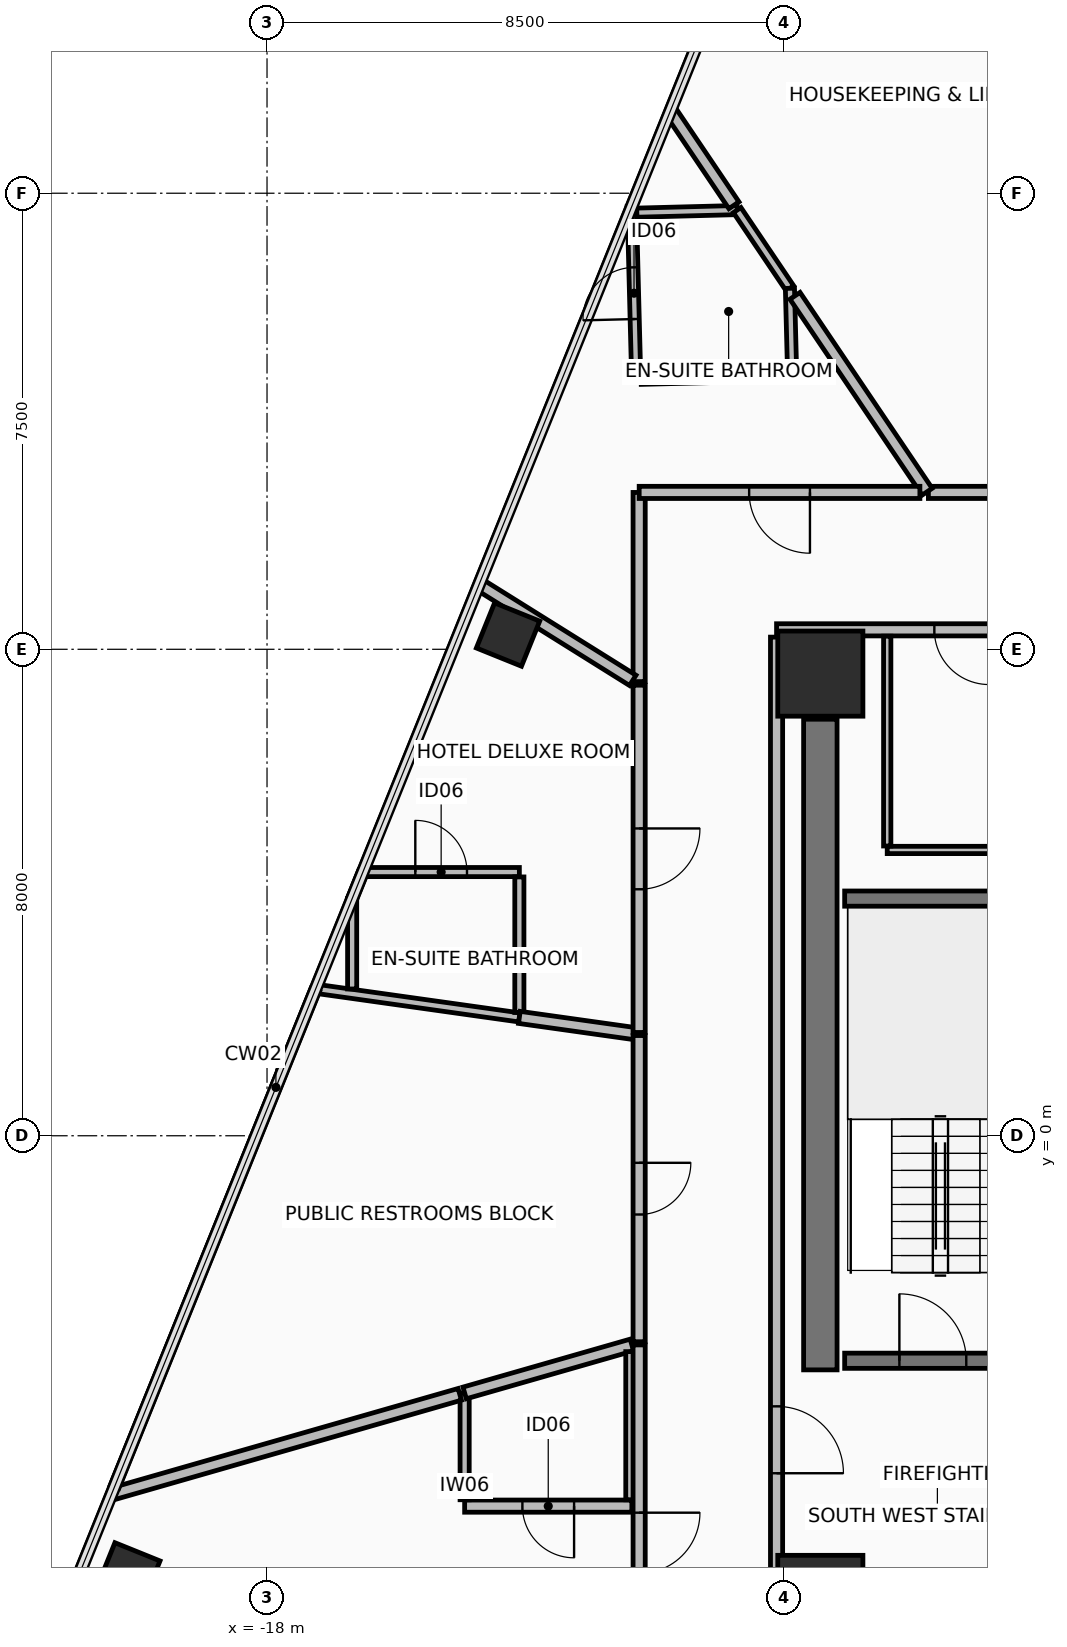
"""IFC4 building model, lengths in metres.
Left out: names, types, materials, properties, quantities, classifications, styles, units other than length and angle.
Written with IfcOpenShell. Run it as: python <this file> out.ifc"""

import sys

from ifc_helpers import new_model, si_unit, direction, frame, frame_2d, origin, origin_2d, place, context, subcontext, project, spatial, rectangle, hollow_rectangle, extrude, element, fill, save


model = new_model("IFC4")
c1 = context("Model", 3, precision=1e-05, world=origin(), true_north=direction((0.0, 1.0)))
c2 = subcontext(c1, "Body", "Model", "MODEL_VIEW")
j1 = project(units=[si_unit("LENGTHUNIT", "METRE"), si_unit("PLANEANGLEUNIT", "RADIAN")], contexts=[c1])
p1 = place(None, origin())
s1 = spatial("IfcSite", under=j1, at=p1, CompositionType="ELEMENT")
p2 = place(p1, origin())
s2 = spatial("IfcBuilding", under=s1, at=p2, CompositionType="ELEMENT")
p3 = place(p2, frame((0.0, 0.0, 70.75)))
s3 = spatial("IfcBuildingStorey", under=s2, at=p3, CompositionType="ELEMENT", Elevation=70.75)
for number, where, z_axis, x_axis in (
    (1, (-8.9, -7.6, 0.0), (0.0, 0.0, 1.0), (1.0, 0.0, 0.0)),
    (2, (-8.9, 7.6, 0.0), (0.0, 0.0, 1.0), (1.0, 0.0, 0.0)),
):
    element("IfcColumn", number, at=place(p3, frame(where, z_axis=z_axis, x_axis=x_axis)), inside=s3, PredefinedType="COLUMN", context=c2, shape_type="SweptSolid", body=[
        extrude(rectangle(XDim=1.4, YDim=1.4, at=origin_2d()), origin(), (0.0, 0.0, 1.0), 3.45),
    ])
for number, where, z_axis, x_axis in (
    (3, (-14.036, 8.242, 0.0), (0.0, 0.0, 1.0), (0.375, 0.927, 0.0)),
    (4, (-20.281, -7.213, 0.0), (0.0, 0.0, 1.0), (0.375, 0.927, 0.0)),
):
    element("IfcColumn", number, at=place(p3, frame(where, z_axis=z_axis, x_axis=x_axis)), inside=s3, PredefinedType="COLUMN", context=c2, shape_type="SweptSolid", body=[
        extrude(hollow_rectangle(XDim=0.8, YDim=0.8, WallThickness=0.045, at=origin_2d()), origin(), (0.0, 0.0, 1.0), 3.45),
    ])
p4 = place(p3, frame((-8.9, -3.85, 0.0), z_axis=(0.0, 0.0, 1.0), x_axis=(0.0, 1.0, 0.0)))
e5 = element("IfcWall", 5, at=p4, inside=s3, PredefinedType="SHEAR", context=c2, shape_type="SweptSolid", body=[
    extrude(rectangle(XDim=10.7, YDim=0.55, at=frame_2d((5.35, 0.0))), origin(), (0.0, 0.0, 1.0), 3.275),
])
p5 = place(p3, frame((9.62, 8.32, 0.0), z_axis=(0.0, 0.0, 1.0), x_axis=(-1.0, 0.0, 0.0)))
e6 = element("IfcWall", 6, at=p5, inside=s3, PredefinedType="PARTITIONING", context=c2, shape_type="SweptSolid", body=[
    extrude(rectangle(XDim=19.24, YDim=0.2, at=frame_2d((9.62, 0.0))), origin(), (0.0, 0.0, 1.0), 2.62),
])
p6 = place(p5, frame((15.745, 0.0, 0.0)))
e7 = element("IfcOpeningElement", 7, at=p6, cuts=e6, PredefinedType="OPENING", context=c2, shape_type="SweptSolid", body=[
    extrude(rectangle(XDim=0.9, YDim=2.1, at=frame_2d((0.45, 1.05))), frame((0.0, 0.11, 0.0), z_axis=(0.0, -1.0, 0.0), x_axis=(1.0, 0.0, 0.0)), (0.0, 0.0, 1.0), 0.22),
])
p7 = place(p5, frame((13.795, 0.0, 0.0)))
e8 = element("IfcOpeningElement", 8, at=p7, cuts=e6, PredefinedType="OPENING", context=c2, shape_type="SweptSolid", body=[
    extrude(rectangle(XDim=0.9, YDim=2.1, at=frame_2d((0.45, 1.05))), frame((0.0, 0.11, 0.0), z_axis=(0.0, -1.0, 0.0), x_axis=(1.0, 0.0, 0.0)), (0.0, 0.0, 1.0), 0.22),
])
p8 = place(p3, frame((-9.62, 8.2, 0.0), z_axis=(0.0, 0.0, 1.0), x_axis=(0.0, -1.0, 0.0)))
e9 = element("IfcWall", 9, at=p8, inside=s3, PredefinedType="PARTITIONING", context=c2, shape_type="SweptSolid", body=[
    extrude(rectangle(XDim=16.4, YDim=0.2, at=frame_2d((8.2, 0.0))), origin(), (0.0, 0.0, 1.0), 2.67),
])
p9 = place(p8, frame((12.65, 0.0, 0.0)))
e10 = element("IfcOpeningElement", 10, at=p9, cuts=e9, PredefinedType="OPENING", context=c2, shape_type="SweptSolid", body=[
    extrude(rectangle(XDim=1.1, YDim=2.15, at=frame_2d((0.55, 1.075))), frame((0.0, 0.11, 0.0), z_axis=(0.0, -1.0, 0.0), x_axis=(1.0, 0.0, 0.0)), (0.0, 0.0, 1.0), 0.22),
])
p10 = place(p3, frame((-8.5, -3.7, 0.0), z_axis=(0.0, 0.0, 1.0), x_axis=(1.0, 0.0, 0.0)))
e11 = element("IfcWall", 11, at=p10, inside=s3, PredefinedType="SHEAR", context=c2, shape_type="SweptSolid", body=[
    extrude(rectangle(XDim=2.95, YDim=0.25, at=frame_2d((1.475, 0.0))), origin(), (0.0, 0.0, 1.0), 3.275),
])
p11 = place(p10, frame((0.9, 0.0, 0.0)))
e12 = element("IfcOpeningElement", 12, at=p11, cuts=e11, PredefinedType="OPENING", context=c2, shape_type="SweptSolid", body=[
    extrude(rectangle(XDim=1.1, YDim=2.15, at=frame_2d((0.55, 1.075))), frame((0.0, 0.135, 0.0), z_axis=(0.0, -1.0, 0.0), x_axis=(1.0, 0.0, 0.0)), (0.0, 0.0, 1.0), 0.27),
])
p12 = place(p3, frame((-8.5, 3.9, 0.0), z_axis=(0.0, 0.0, 1.0), x_axis=(1.0, 0.0, 0.0)))
e13 = element("IfcWall", 13, at=p12, inside=s3, PredefinedType="SHEAR", context=c2, shape_type="SweptSolid", body=[
    extrude(rectangle(XDim=2.95, YDim=0.25, at=frame_2d((1.475, 0.0))), origin(), (0.0, 0.0, 1.0), 3.275),
])
p13 = place(p3, frame((-7.8, 4.7, 0.0), z_axis=(0.0, 0.0, 1.0), x_axis=(1.0, 0.0, 0.0)))
e14 = element("IfcWall", 14, at=p13, inside=s3, PredefinedType="PARTITIONING", context=c2, shape_type="SweptSolid", body=[
    extrude(rectangle(XDim=2.45, YDim=0.12, at=frame_2d((1.225, 0.0))), origin(), (0.0, 0.0, 1.0), 3.275),
])
p14 = place(p3, frame((-7.8, 8.215, 0.0), z_axis=(0.0, 0.0, 1.0), x_axis=(0.0, -1.0, 0.0)))
e15 = element("IfcWall", 15, at=p14, inside=s3, PredefinedType="PARTITIONING", context=c2, shape_type="SweptSolid", body=[
    extrude(rectangle(XDim=3.45, YDim=0.12, at=frame_2d((1.725, 0.0))), origin(), (0.0, 0.0, 1.0), 2.47),
])
p15 = place(p3, frame((-11.927, 12.429, 0.0), z_axis=(0.0, 0.0, 1.0), x_axis=(-0.025753181092, 0.99966833183, 0.0)))
e16 = element("IfcWall", 16, at=p15, inside=s3, PredefinedType="PARTITIONING", context=c2, shape_type="SweptSolid", body=[
    extrude(rectangle(XDim=2.854, YDim=0.15, at=frame_2d((1.427, 0.0))), origin(), (0.0, 0.0, 1.0), 2.47),
])
p16 = place(p15, frame((1.002, 0.0, 0.0)))
e17 = element("IfcOpeningElement", 17, at=p16, cuts=e16, PredefinedType="OPENING", context=c2, shape_type="SweptSolid", body=[
    extrude(rectangle(XDim=0.85, YDim=2.1, at=frame_2d((0.425, 1.05))), frame((0.0, 0.085, 0.0), z_axis=(0.0, -1.0, 0.0), x_axis=(1.0, 0.0, 0.0)), (0.0, 0.0, 1.0), 0.17),
])
p17 = place(p3, frame((-11.918, 15.18, 0.0), z_axis=(0.0, 0.0, 1.0), x_axis=(0.999668899852, 0.02573112257, 0.0)))
e18 = element("IfcWall", 18, at=p17, inside=s3, PredefinedType="PARTITIONING", context=c2, shape_type="SweptSolid", body=[
    extrude(rectangle(XDim=1.651, YDim=0.15, at=frame_2d((0.825, 0.0))), origin(), (0.0, 0.0, 1.0), 2.47),
])
p18 = place(p3, frame((-10.268, 15.223, 0.0), z_axis=(0.0, 0.0, 1.0), x_axis=(0.559229675695, -0.82901276819, 0.0)))
e19 = element("IfcWall", 19, at=p18, inside=s3, PredefinedType="PARTITIONING", context=c2, shape_type="SweptSolid", body=[
    extrude(rectangle(XDim=1.552, YDim=0.15, at=frame_2d((0.776, 0.0))), origin(), (0.0, 0.0, 1.0), 3.275),
])
p19 = place(p3, frame((-9.4, 13.936, 0.0), z_axis=(0.0, 0.0, 1.0), x_axis=(0.025745445057, -0.999668531094, 0.0)))
e20 = element("IfcWall", 20, at=p19, inside=s3, PredefinedType="PARTITIONING", context=c2, shape_type="SweptSolid", body=[
    extrude(rectangle(XDim=1.441, YDim=0.15, at=frame_2d((0.721, 0.0))), origin(), (0.0, 0.0, 1.0), 3.275),
])
p20 = place(p3, frame((-9.443, 12.493, 0.0), z_axis=(0.0, 0.0, 1.0), x_axis=(-0.999667618691, -0.025780848324, 0.0)))
e21 = element("IfcWall", 21, at=p20, inside=s3, PredefinedType="PARTITIONING", context=c2, shape_type="SweptSolid", body=[
    extrude(rectangle(XDim=2.405, YDim=0.15, at=frame_2d((1.203, 0.0))), origin(), (0.0, 0.0, 1.0), 3.275),
])
p21 = place(p3, frame((-13.85, 1.947, 0.0), z_axis=(0.0, 0.0, 1.0), x_axis=(-0.99026466636, 0.139197308016, 0.0)))
e22 = element("IfcWall", 22, at=p21, inside=s3, PredefinedType="PARTITIONING", context=c2, shape_type="SweptSolid", body=[
    extrude(rectangle(XDim=3.382, YDim=0.15, at=frame_2d((1.691, 0.0))), origin(), (0.0, 0.0, 1.0), 2.47),
])
p22 = place(p3, frame((-16.6, 2.414, 0.0), z_axis=(0.0, 0.0, 1.0), x_axis=(0.0, 1.0, 0.0)))
e23 = element("IfcWall", 23, at=p22, inside=s3, PredefinedType="PARTITIONING", context=c2, shape_type="SweptSolid", body=[
    extrude(rectangle(XDim=1.485, YDim=0.15, at=frame_2d((0.743, 0.0))), origin(), (0.0, 0.0, 1.0), 2.47),
])
p23 = place(p3, frame((-16.6, 3.899, 0.0), z_axis=(0.0, 0.0, 1.0), x_axis=(0.374779708699, 0.927113892652, 0.0)))
e24 = element("IfcWall", 24, at=p23, inside=s3, PredefinedType="PARTITIONING", context=c2, shape_type="SweptSolid", body=[
    extrude(rectangle(XDim=0.472, YDim=0.15, at=frame_2d((0.236, 0.0))), origin(), (0.0, 0.0, 1.0), 3.275),
])
p24 = place(p3, frame((-16.423, 4.336, 0.0), z_axis=(0.0, 0.0, 1.0), x_axis=(1.0, 0.0, 0.0)))
e25 = element("IfcWall", 25, at=p24, inside=s3, PredefinedType="PARTITIONING", context=c2, shape_type="SweptSolid", body=[
    extrude(rectangle(XDim=2.573, YDim=0.15, at=frame_2d((1.287, 0.0))), origin(), (0.0, 0.0, 1.0), 2.47),
])
p25 = place(p24, frame((0.862, 0.0, 0.0)))
e26 = element("IfcOpeningElement", 26, at=p25, cuts=e25, PredefinedType="OPENING", context=c2, shape_type="SweptSolid", body=[
    extrude(rectangle(XDim=0.85, YDim=2.1, at=frame_2d((0.425, 1.05))), frame((0.0, 0.085, 0.0), z_axis=(0.0, -1.0, 0.0), x_axis=(1.0, 0.0, 0.0)), (0.0, 0.0, 1.0), 0.17),
])
p26 = place(p3, frame((-13.85, 4.257, 0.0), z_axis=(0.0, 0.0, 1.0), x_axis=(0.0, -1.0, 0.0)))
e27 = element("IfcWall", 27, at=p26, inside=s3, PredefinedType="PARTITIONING", context=c2, shape_type="SweptSolid", body=[
    extrude(rectangle(XDim=2.229, YDim=0.15, at=frame_2d((1.115, 0.0))), origin(), (0.0, 0.0, 1.0), 3.275),
])
p27 = place(p3, frame((-12.0, -6.091, 0.0), z_axis=(0.0, 0.0, 1.0), x_axis=(-1.0, 0.0, 0.0)))
e28 = element("IfcWall", 28, at=p27, inside=s3, PredefinedType="PARTITIONING", context=c2, shape_type="SweptSolid", body=[
    extrude(rectangle(XDim=2.75, YDim=0.2, at=frame_2d((1.375, 0.0))), origin(), (0.0, 0.0, 1.0), 2.87),
])
p28 = place(p27, frame((0.95, 0.0, 0.0)))
e29 = element("IfcOpeningElement", 29, at=p28, cuts=e28, PredefinedType="OPENING", context=c2, shape_type="SweptSolid", body=[
    extrude(rectangle(XDim=0.85, YDim=2.1, at=frame_2d((0.425, 1.05))), frame((0.0, 0.11, 0.0), z_axis=(0.0, -1.0, 0.0), x_axis=(1.0, 0.0, 0.0)), (0.0, 0.0, 1.0), 0.22),
])
p29 = place(p3, frame((-14.75, -5.986, 0.0), z_axis=(0.0, 0.0, 1.0), x_axis=(0.0, 1.0, 0.0)))
e30 = element("IfcWall", 30, at=p29, inside=s3, PredefinedType="PARTITIONING", context=c2, shape_type="SweptSolid", body=[
    extrude(rectangle(XDim=1.756, YDim=0.15, at=frame_2d((0.878, 0.0))), origin(), (0.0, 0.0, 1.0), 2.87),
])
p30 = place(p3, frame((-14.75, -4.229, 0.0), z_axis=(0.0, 0.0, 1.0), x_axis=(0.961259435334, 0.275645239358, 0.0)))
e31 = element("IfcWall", 31, at=p30, inside=s3, PredefinedType="PARTITIONING", context=c2, shape_type="SweptSolid", body=[
    extrude(rectangle(XDim=2.861, YDim=0.2, at=frame_2d((1.43, 0.0))), origin(), (0.0, 0.0, 1.0), 2.87),
])
p31 = place(p3, frame((-12.0, -3.55, 0.0), z_axis=(0.0, 0.0, 1.0), x_axis=(0.0, -1.0, 0.0)))
e32 = element("IfcWall", 32, at=p31, inside=s3, PredefinedType="PARTITIONING", context=c2, shape_type="SweptSolid", body=[
    extrude(rectangle(XDim=2.436, YDim=0.2, at=frame_2d((1.218, 0.0))), origin(), (0.0, 0.0, 1.0), 3.275),
])
p32 = place(p3, frame((-13.85, 1.947, 0.0), z_axis=(0.0, 0.0, 1.0), x_axis=(0.990262192263, -0.139214907871, 0.0)))
e33 = element("IfcWall", 33, at=p32, inside=s3, PredefinedType="PARTITIONING", context=c2, shape_type="SweptSolid", body=[
    extrude(rectangle(XDim=1.968, YDim=0.2, at=frame_2d((0.984, 0.0))), origin(), (0.0, 0.0, 1.0), 2.87),
])
p33 = place(p3, frame((-11.88, 1.648, 0.0), z_axis=(0.0, 0.0, 1.0), x_axis=(0.0, -1.0, 0.0)))
e34 = element("IfcWall", 34, at=p33, inside=s3, PredefinedType="PARTITIONING", context=c2, shape_type="SweptSolid", body=[
    extrude(rectangle(XDim=5.036, YDim=0.2, at=frame_2d((2.518, 0.0))), origin(), (0.0, 0.0, 1.0), 3.275),
])
p34 = place(p33, frame((2.093, 0.0, 0.0)))
e35 = element("IfcOpeningElement", 35, at=p34, cuts=e34, PredefinedType="OPENING", context=c2, shape_type="SweptSolid", body=[
    extrude(rectangle(XDim=0.85, YDim=2.1, at=frame_2d((0.425, 1.05))), frame((0.0, 0.11, 0.0), z_axis=(0.0, -1.0, 0.0), x_axis=(1.0, 0.0, 0.0)), (0.0, 0.0, 1.0), 0.22),
])
p35 = place(p3, frame((-14.83, -4.252, 0.0), z_axis=(0.0, 0.0, 1.0), x_axis=(-0.961263721078, -0.275630293216, 0.0)))
e36 = element("IfcWall", 36, at=p35, inside=s3, PredefinedType="PARTITIONING", context=c2, shape_type="SweptSolid", body=[
    extrude(rectangle(XDim=5.958, YDim=0.2, at=frame_2d((2.979, 0.0))), origin(), (0.0, 0.0, 1.0), 2.47),
])
p36 = place(p3, frame((-20.507, -5.771, 0.0), z_axis=(0.0, 0.0, 1.0), x_axis=(0.374622465586, 0.927177441636, 0.0)))
e37 = element("IfcWall", 37, at=p36, inside=s3, PredefinedType="PARTITIONING", context=c2, shape_type="SweptSolid", body=[
    extrude(rectangle(XDim=8.812, YDim=0.15, at=frame_2d((4.406, 0.0))), origin(), (0.0, 0.0, 1.0), 3.275),
])
p37 = place(p3, frame((-1.895, 10.58, 0.0), z_axis=(0.0, 0.0, 1.0), x_axis=(-1.0, 0.0, 0.0)))
e38 = element("IfcWall", 38, at=p37, inside=s3, PredefinedType="PARTITIONING", context=c2, shape_type="SweptSolid", body=[
    extrude(rectangle(XDim=5.228, YDim=0.2, at=frame_2d((2.614, 0.0))), origin(), (0.0, 0.0, 1.0), 3.275),
])
p38 = place(p37, frame((2.164, 0.0, 0.0)))
e39 = element("IfcOpeningElement", 39, at=p38, cuts=e38, PredefinedType="OPENING", context=c2, shape_type="SweptSolid", body=[
    extrude(rectangle(XDim=0.9, YDim=2.1, at=frame_2d((0.45, 1.05))), frame((0.0, 0.11, 0.0), z_axis=(0.0, -1.0, 0.0), x_axis=(1.0, 0.0, 0.0)), (0.0, 0.0, 1.0), 0.22),
])
p39 = place(p3, frame((-7.144, 10.591, 0.0), z_axis=(0.0, 0.0, 1.0), x_axis=(-0.559171794076, 0.829051810631, 0.0)))
e40 = element("IfcWall", 40, at=p39, inside=s3, PredefinedType="PARTITIONING", context=c2, shape_type="SweptSolid", body=[
    extrude(rectangle(XDim=3.886, YDim=0.2, at=frame_2d((1.943, 0.0))), origin(), (0.0, 0.0, 1.0), 2.62),
])
p40 = place(p3, frame((-10.321, 15.302, 0.0), z_axis=(0.0, 0.0, 1.0), x_axis=(-0.559274091042, 0.828982805062, 0.0)))
e41 = element("IfcWall", 41, at=p40, inside=s3, PredefinedType="PARTITIONING", context=c2, shape_type="SweptSolid", body=[
    extrude(rectangle(XDim=1.857, YDim=0.2, at=frame_2d((0.928, 0.0))), origin(), (0.0, 0.0, 1.0), 2.47),
])
p41 = place(p3, frame((-11.88, 10.579, 0.0), z_axis=(0.0, 0.0, 1.0), x_axis=(0.0, -1.0, 0.0)))
e42 = element("IfcWall", 42, at=p41, inside=s3, PredefinedType="PARTITIONING", context=c2, shape_type="SweptSolid", body=[
    extrude(rectangle(XDim=3.111, YDim=0.2, at=frame_2d((1.555, 0.0))), origin(), (0.0, 0.0, 1.0), 2.67),
])
p42 = place(p3, frame((-11.985, 7.489, 0.0), z_axis=(0.0, 0.0, 1.0), x_axis=(-0.84801684821, 0.52996926812, 0.0)))
e43 = element("IfcWall", 43, at=p42, inside=s3, PredefinedType="PARTITIONING", context=c2, shape_type="SweptSolid", body=[
    extrude(rectangle(XDim=2.958, YDim=0.2, at=frame_2d((1.479, 0.0))), origin(), (0.0, 0.0, 1.0), 2.47),
])
p43 = place(p3, frame((-7.263, 10.58, 0.0), z_axis=(0.0, 0.0, 1.0), x_axis=(-1.0, 0.0, 0.0)))
e44 = element("IfcWall", 44, at=p43, inside=s3, PredefinedType="PARTITIONING", context=c2, shape_type="SweptSolid", body=[
    extrude(rectangle(XDim=4.616, YDim=0.2, at=frame_2d((2.308, 0.0))), origin(), (0.0, 0.0, 1.0), 2.62),
])
p44 = place(p43, frame((1.808, 0.0, 0.0)))
e45 = element("IfcOpeningElement", 45, at=p44, cuts=e44, PredefinedType="OPENING", context=c2, shape_type="SweptSolid", body=[
    extrude(rectangle(XDim=1.0, YDim=2.15, at=frame_2d((0.5, 1.075))), frame((0.0, 0.11, 0.0), z_axis=(0.0, -1.0, 0.0), x_axis=(1.0, 0.0, 0.0)), (0.0, 0.0, 1.0), 0.22),
])
p45 = place(p3, frame((-11.88, 7.41, 0.0), z_axis=(0.0, 0.0, 1.0), x_axis=(0.0, -1.0, 0.0)))
e46 = element("IfcWall", 46, at=p45, inside=s3, PredefinedType="PARTITIONING", context=c2, shape_type="SweptSolid", body=[
    extrude(rectangle(XDim=5.711, YDim=0.2, at=frame_2d((2.855, 0.0))), origin(), (0.0, 0.0, 1.0), 2.87),
])
p46 = place(p45, frame((2.356, 0.0, 0.0)))
e47 = element("IfcOpeningElement", 47, at=p46, cuts=e46, PredefinedType="OPENING", context=c2, shape_type="SweptSolid", body=[
    extrude(rectangle(XDim=1.0, YDim=2.15, at=frame_2d((0.5, 1.075))), frame((0.0, 0.11, 0.0), z_axis=(0.0, -1.0, 0.0), x_axis=(1.0, 0.0, 0.0)), (0.0, 0.0, 1.0), 0.22),
])
p47 = place(p3, frame((-11.88, -3.44, 0.0), z_axis=(0.0, 0.0, 1.0), x_axis=(0.0, -1.0, 0.0)))
e48 = element("IfcWall", 48, at=p47, inside=s3, PredefinedType="PARTITIONING", context=c2, shape_type="SweptSolid", body=[
    extrude(rectangle(XDim=6.517, YDim=0.2, at=frame_2d((3.259, 0.0))), origin(), (0.0, 0.0, 1.0), 2.67),
])
p48 = place(p47, frame((2.759, 0.0, 0.0)))
e49 = element("IfcOpeningElement", 49, at=p48, cuts=e48, PredefinedType="OPENING", context=c2, shape_type="SweptSolid", body=[
    extrude(rectangle(XDim=1.0, YDim=2.15, at=frame_2d((0.5, 1.075))), frame((0.0, 0.11, 0.0), z_axis=(0.0, -1.0, 0.0), x_axis=(1.0, 0.0, 0.0)), (0.0, 0.0, 1.0), 0.22),
])
p49 = place(p9, frame((1.1, 0.0, 0.0), z_axis=(0.0, 0.0, 1.0), x_axis=(-1.0, 0.0, 0.0)))
e50 = element("IfcDoor", 50, at=p49, inside=s3, OperationType="SINGLE_SWING_LEFT", PredefinedType="DOOR", context=c2, shape_type="SweptSolid", body=[
    extrude(rectangle(XDim=1.1, YDim=2.15, at=frame_2d((0.55, 1.075))), frame((0.0, 0.025, 0.0), z_axis=(0.0, -1.0, 0.0), x_axis=(1.0, 0.0, 0.0)), (0.0, 0.0, 1.0), 0.05),
])
fill(e10, e50)
p50 = place(p11, origin())
e51 = element("IfcDoor", 51, at=p50, inside=s3, OperationType="SINGLE_SWING_LEFT", PredefinedType="DOOR", context=c2, shape_type="SweptSolid", body=[
    extrude(rectangle(XDim=1.1, YDim=2.15, at=frame_2d((0.55, 1.075))), frame((0.0, 0.025, 0.0), z_axis=(0.0, -1.0, 0.0), x_axis=(1.0, 0.0, 0.0)), (0.0, 0.0, 1.0), 0.05),
])
fill(e12, e51)
p51 = place(p6, origin())
e52 = element("IfcDoor", 52, at=p51, inside=s3, OperationType="SINGLE_SWING_LEFT", PredefinedType="DOOR", context=c2, shape_type="SweptSolid", body=[
    extrude(rectangle(XDim=0.9, YDim=2.1, at=frame_2d((0.45, 1.05))), frame((0.0, 0.025, 0.0), z_axis=(0.0, -1.0, 0.0), x_axis=(1.0, 0.0, 0.0)), (0.0, 0.0, 1.0), 0.05),
])
fill(e7, e52)
p52 = place(p16, origin())
e53 = element("IfcDoor", 53, at=p52, inside=s3, OperationType="SINGLE_SWING_RIGHT", PredefinedType="DOOR", context=c2, shape_type="SweptSolid", body=[
    extrude(rectangle(XDim=0.85, YDim=2.1, at=frame_2d((0.425, 1.05))), frame((0.0, 0.025, 0.0), z_axis=(0.0, -1.0, 0.0), x_axis=(1.0, 0.0, 0.0)), (0.0, 0.0, 1.0), 0.05),
])
fill(e17, e53)
p53 = place(p25, origin())
e54 = element("IfcDoor", 54, at=p53, inside=s3, OperationType="SINGLE_SWING_RIGHT", PredefinedType="DOOR", context=c2, shape_type="SweptSolid", body=[
    extrude(rectangle(XDim=0.85, YDim=2.1, at=frame_2d((0.425, 1.05))), frame((0.0, 0.025, 0.0), z_axis=(0.0, -1.0, 0.0), x_axis=(1.0, 0.0, 0.0)), (0.0, 0.0, 1.0), 0.05),
])
fill(e26, e54)
p54 = place(p28, origin())
e55 = element("IfcDoor", 55, at=p54, inside=s3, OperationType="SINGLE_SWING_RIGHT", PredefinedType="DOOR", context=c2, shape_type="SweptSolid", body=[
    extrude(rectangle(XDim=0.85, YDim=2.1, at=frame_2d((0.425, 1.05))), frame((0.0, 0.025, 0.0), z_axis=(0.0, -1.0, 0.0), x_axis=(1.0, 0.0, 0.0)), (0.0, 0.0, 1.0), 0.05),
])
fill(e29, e55)
p55 = place(p34, origin())
e56 = element("IfcDoor", 56, at=p55, inside=s3, OperationType="SINGLE_SWING_RIGHT", PredefinedType="DOOR", context=c2, shape_type="SweptSolid", body=[
    extrude(rectangle(XDim=0.85, YDim=2.1, at=frame_2d((0.425, 1.05))), frame((0.0, 0.025, 0.0), z_axis=(0.0, -1.0, 0.0), x_axis=(1.0, 0.0, 0.0)), (0.0, 0.0, 1.0), 0.05),
])
fill(e35, e56)
p56 = place(p44, origin())
e57 = element("IfcDoor", 57, at=p56, inside=s3, OperationType="SINGLE_SWING_LEFT", PredefinedType="DOOR", context=c2, shape_type="SweptSolid", body=[
    extrude(rectangle(XDim=1.0, YDim=2.15, at=frame_2d((0.5, 1.075))), frame((0.0, 0.025, 0.0), z_axis=(0.0, -1.0, 0.0), x_axis=(1.0, 0.0, 0.0)), (0.0, 0.0, 1.0), 0.05),
])
fill(e45, e57)
p57 = place(p46, origin())
e58 = element("IfcDoor", 58, at=p57, inside=s3, OperationType="SINGLE_SWING_LEFT", PredefinedType="DOOR", context=c2, shape_type="SweptSolid", body=[
    extrude(rectangle(XDim=1.0, YDim=2.15, at=frame_2d((0.5, 1.075))), frame((0.0, 0.025, 0.0), z_axis=(0.0, -1.0, 0.0), x_axis=(1.0, 0.0, 0.0)), (0.0, 0.0, 1.0), 0.05),
])
fill(e47, e58)
p58 = place(p48, origin())
e59 = element("IfcDoor", 59, at=p58, inside=s3, OperationType="SINGLE_SWING_LEFT", PredefinedType="DOOR", context=c2, shape_type="SweptSolid", body=[
    extrude(rectangle(XDim=1.0, YDim=2.15, at=frame_2d((0.5, 1.075))), frame((0.0, 0.025, 0.0), z_axis=(0.0, -1.0, 0.0), x_axis=(1.0, 0.0, 0.0)), (0.0, 0.0, 1.0), 0.05),
])
fill(e49, e59)
save(model, sys.argv[1])
